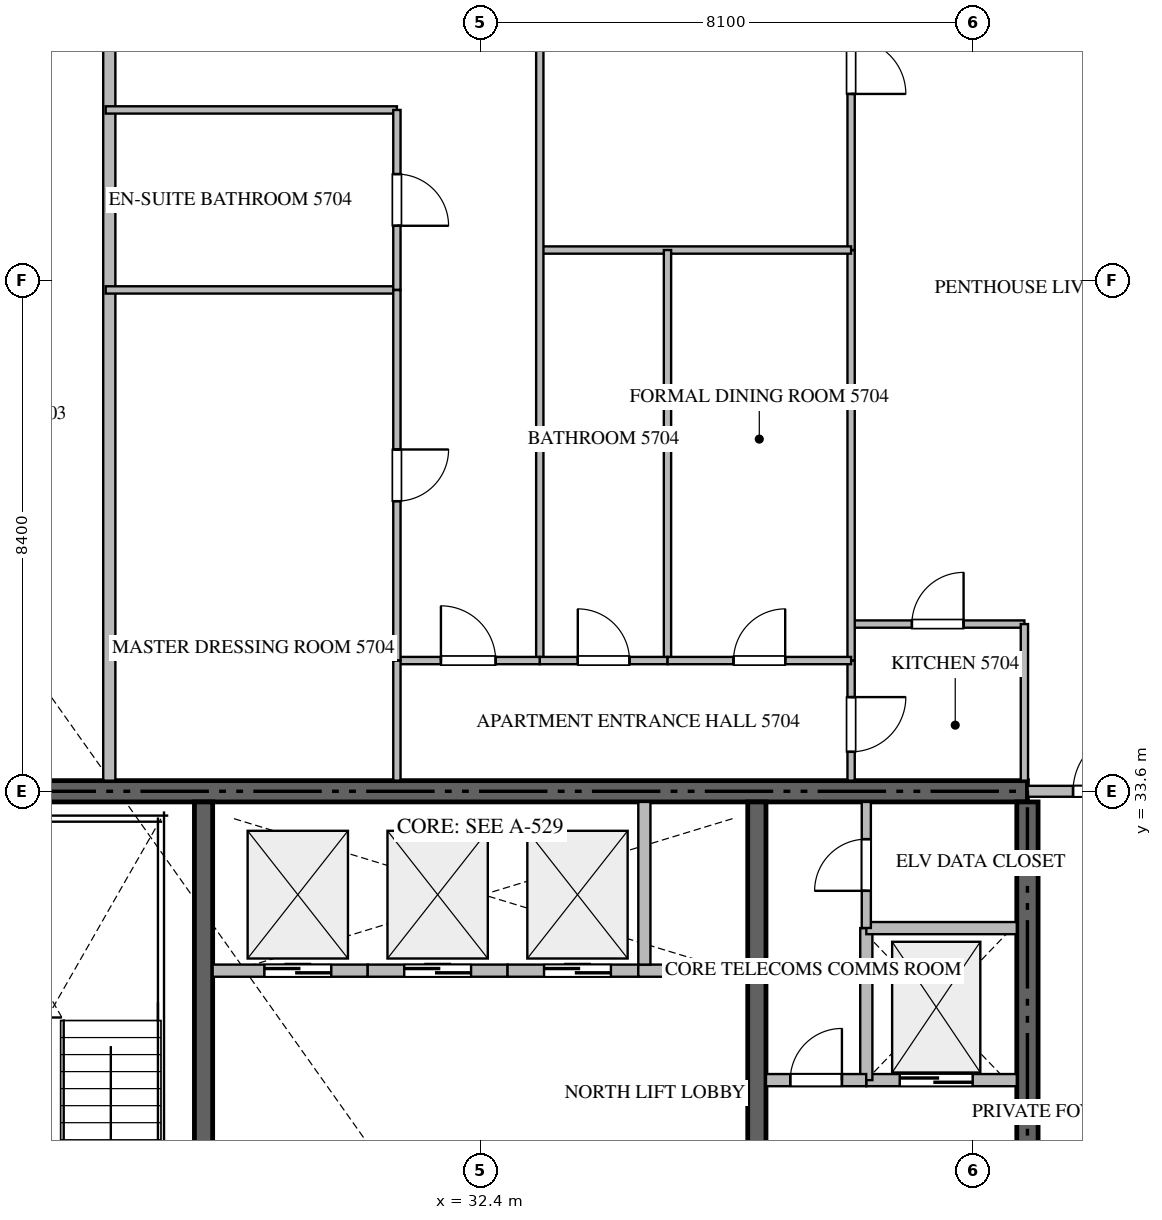
"""IFC4 building model, lengths in metres.
Left out: names, types, materials, properties, quantities, classifications, styles, units other than length and angle.
Written with IfcOpenShell. Run it as: python <this file> out.ifc"""

import sys

from ifc_helpers import new_model, si_unit, direction, frame, frame_2d, origin, place, context, subcontext, project, spatial, rectangle, extrude, source, transform, mapped, element, fill, save


model = new_model("IFC4")
c1 = context("Model", 3, precision=1e-05, world=origin(), true_north=direction((0.0, 1.0)))
c2 = subcontext(c1, "Body", "Model", "MODEL_VIEW")
j1 = project(units=[si_unit("LENGTHUNIT", "METRE"), si_unit("PLANEANGLEUNIT", "RADIAN")], contexts=[c1])
p1 = place(None, origin())
s1 = spatial("IfcSite", under=j1, at=p1, CompositionType="ELEMENT")
p2 = place(p1, origin())
s2 = spatial("IfcBuilding", under=s1, at=p2, CompositionType="ELEMENT")
p3 = place(p2, frame((0.0, 0.0, 229.7)))
s3 = spatial("IfcBuildingStorey", under=s2, at=p3, CompositionType="ELEMENT", Elevation=229.7)
p4 = place(p3, frame((41.4, 33.6, -0.26), z_axis=(0.0, 0.0, 1.0), x_axis=(-1.0, 0.0, 0.0)))
e1 = element("IfcWall", 1, at=p4, inside=s3, PredefinedType="SHEAR", context=c2, shape_type="SweptSolid", body=[
    extrude(rectangle(XDim=18.0, YDim=0.35, at=frame_2d((9.0, 0.0))), origin(), (0.0, 0.0, 1.0), 3.848),
])
p5 = place(p3, frame((41.4, 27.75, -0.26), z_axis=(0.0, 0.0, 1.0), x_axis=(0.0, 1.0, 0.0)))
e2 = element("IfcWall", 2, at=p5, inside=s3, PredefinedType="SHEAR", context=c2, shape_type="SweptSolid", body=[
    extrude(rectangle(XDim=5.675, YDim=0.35, at=frame_2d((2.837, 0.0))), origin(), (0.0, 0.0, 1.0), 3.848),
])
p6 = place(p3, frame((27.85, 23.55, -0.26), z_axis=(0.0, 0.0, 1.0), x_axis=(0.0, 1.0, 0.0)))
e3 = element("IfcWall", 3, at=p6, inside=s3, PredefinedType="SHEAR", context=c2, shape_type="SweptSolid", body=[
    extrude(rectangle(XDim=9.875, YDim=0.3, at=frame_2d((4.938, 0.0))), origin(), (0.0, 0.0, 1.0), 3.848),
])
p7 = place(p3, frame((36.95, 27.05, -0.26), z_axis=(0.0, 0.0, 1.0), x_axis=(0.0, 1.0, 0.0)))
e4 = element("IfcWall", 4, at=p7, inside=s3, PredefinedType="SHEAR", context=c2, shape_type="SweptSolid", body=[
    extrude(rectangle(XDim=6.375, YDim=0.3, at=frame_2d((3.188, 0.0))), origin(), (0.0, 0.0, 1.0), 3.848),
])
p8 = place(p3, frame((38.75, 28.85, 0.0), z_axis=(0.0, 0.0, 1.0), x_axis=(1.0, 0.0, 0.0)))
e5 = element("IfcWall", 5, at=p8, inside=s3, PredefinedType="STANDARD", context=c2, shape_type="SweptSolid", body=[
    extrude(rectangle(XDim=2.475, YDim=0.2, at=frame_2d((1.238, 0.0))), origin(), (0.0, 0.0, 1.0), 3.59),
])
p9 = place(p8, frame((0.55, 0.0, 0.0)))
e6 = element("IfcOpeningElement", 6, at=p9, cuts=e5, PredefinedType="OPENING", context=c2, shape_type="SweptSolid", body=[
    extrude(rectangle(XDim=1.2, YDim=2.2, at=frame_2d((0.6, 1.1))), frame((0.0, 0.11, 0.0), z_axis=(0.0, -1.0, 0.0), x_axis=(1.0, 0.0, 0.0)), (0.0, 0.0, 1.0), 0.22),
])
p10 = place(p3, frame((28.0, 30.65, 0.0), z_axis=(0.0, 0.0, 1.0), x_axis=(1.0, 0.0, 0.0)))
e7 = element("IfcWall", 7, at=p10, inside=s3, PredefinedType="STANDARD", context=c2, shape_type="SweptSolid", body=[
    extrude(rectangle(XDim=2.55, YDim=0.2, at=frame_2d((1.275, 0.0))), origin(), (0.0, 0.0, 1.0), 3.59),
])
p11 = place(p10, frame((0.85, 0.0, 0.0)))
e8 = element("IfcOpeningElement", 8, at=p11, cuts=e7, PredefinedType="OPENING", context=c2, shape_type="SweptSolid", body=[
    extrude(rectangle(XDim=1.1, YDim=2.2, at=frame_2d((0.55, 1.1))), frame((0.0, 0.11, 0.0), z_axis=(0.0, -1.0, 0.0), x_axis=(1.0, 0.0, 0.0)), (0.0, 0.0, 1.0), 0.22),
])
p12 = place(p3, frame((30.55, 30.65, 0.0), z_axis=(0.0, 0.0, 1.0), x_axis=(1.0, 0.0, 0.0)))
e9 = element("IfcWall", 9, at=p12, inside=s3, PredefinedType="STANDARD", context=c2, shape_type="SweptSolid", body=[
    extrude(rectangle(XDim=2.3, YDim=0.2, at=frame_2d((1.15, 0.0))), origin(), (0.0, 0.0, 1.0), 3.59),
])
p13 = place(p12, frame((0.6, 0.0, 0.0)))
e10 = element("IfcOpeningElement", 10, at=p13, cuts=e9, PredefinedType="OPENING", context=c2, shape_type="SweptSolid", body=[
    extrude(rectangle(XDim=1.1, YDim=2.2, at=frame_2d((0.55, 1.1))), frame((0.0, 0.11, 0.0), z_axis=(0.0, -1.0, 0.0), x_axis=(1.0, 0.0, 0.0)), (0.0, 0.0, 1.0), 0.22),
])
p14 = place(p3, frame((32.85, 30.65, 0.0), z_axis=(0.0, 0.0, 1.0), x_axis=(1.0, 0.0, 0.0)))
e11 = element("IfcWall", 11, at=p14, inside=s3, PredefinedType="STANDARD", context=c2, shape_type="SweptSolid", body=[
    extrude(rectangle(XDim=2.15, YDim=0.2, at=frame_2d((1.075, 0.0))), origin(), (0.0, 0.0, 1.0), 3.59),
])
p15 = place(p14, frame((0.6, 0.0, 0.0)))
e12 = element("IfcOpeningElement", 12, at=p15, cuts=e11, PredefinedType="OPENING", context=c2, shape_type="SweptSolid", body=[
    extrude(rectangle(XDim=1.1, YDim=2.2, at=frame_2d((0.55, 1.1))), frame((0.0, 0.11, 0.0), z_axis=(0.0, -1.0, 0.0), x_axis=(1.0, 0.0, 0.0)), (0.0, 0.0, 1.0), 0.22),
])
p16 = place(p3, frame((35.0, 30.65, 0.0), z_axis=(0.0, 0.0, 1.0), x_axis=(1.0, 0.0, 0.0)))
e13 = element("IfcWall", 13, at=p16, inside=s3, PredefinedType="STANDARD", context=c2, shape_type="SweptSolid", body=[
    extrude(rectangle(XDim=1.8, YDim=0.2, at=frame_2d((0.9, 0.0))), origin(), (0.0, 0.0, 1.0), 3.59),
])
p17 = place(p3, frame((35.1, 30.75, 0.0), z_axis=(0.0, 0.0, 1.0), x_axis=(0.0, 1.0, 0.0)))
e14 = element("IfcWall", 14, at=p17, inside=s3, PredefinedType="STANDARD", context=c2, shape_type="SweptSolid", body=[
    extrude(rectangle(XDim=2.675, YDim=0.2, at=frame_2d((1.337, 0.0))), origin(), (0.0, 0.0, 1.0), 3.59),
])
p18 = place(p3, frame((38.75, 28.85, 0.0), z_axis=(0.0, 0.0, 1.0), x_axis=(0.0, 1.0, 0.0)))
e15 = element("IfcWall", 15, at=p18, inside=s3, PredefinedType="STANDARD", context=c2, shape_type="SweptSolid", body=[
    extrude(rectangle(XDim=2.5, YDim=0.2, at=frame_2d((1.25, 0.0))), origin(), (0.0, 0.0, 1.0), 3.59),
])
p19 = place(p3, frame((38.75, 31.35, 0.0), z_axis=(0.0, 0.0, 1.0), x_axis=(1.0, 0.0, 0.0)))
e16 = element("IfcWall", 16, at=p19, inside=s3, PredefinedType="STANDARD", context=c2, shape_type="SweptSolid", body=[
    extrude(rectangle(XDim=2.475, YDim=0.2, at=frame_2d((1.238, 0.0))), origin(), (0.0, 0.0, 1.0), 3.59),
])
p20 = place(p3, frame((37.1, 28.85, 0.0), z_axis=(0.0, 0.0, 1.0), x_axis=(1.0, 0.0, 0.0)))
e17 = element("IfcWall", 17, at=p20, inside=s3, PredefinedType="STANDARD", context=c2, shape_type="SweptSolid", body=[
    extrude(rectangle(XDim=1.648, YDim=0.2, at=frame_2d((0.824, 0.0))), origin(), (0.0, 0.0, 1.0), 3.59),
])
p21 = place(p20, frame((0.399, 0.0, 0.0)))
e18 = element("IfcOpeningElement", 18, at=p21, cuts=e17, PredefinedType="OPENING", context=c2, shape_type="SweptSolid", body=[
    extrude(rectangle(XDim=0.85, YDim=2.1, at=frame_2d((0.425, 1.05))), frame((0.0, 0.11, 0.0), z_axis=(0.0, -1.0, 0.0), x_axis=(1.0, 0.0, 0.0)), (0.0, 0.0, 1.0), 0.22),
])
p22 = place(p3, frame((38.75, 31.352, 0.0), z_axis=(0.0, 0.0, 1.0), x_axis=(0.0, 1.0, 0.0)))
e19 = element("IfcWall", 19, at=p22, inside=s3, PredefinedType="PARTITIONING", context=c2, shape_type="SweptSolid", body=[
    extrude(rectangle(XDim=2.073, YDim=0.15, at=frame_2d((1.037, 0.0))), origin(), (0.0, 0.0, 1.0), 3.59),
])
p23 = place(p22, frame((0.611, 0.0, 0.0)))
e20 = element("IfcOpeningElement", 20, at=p23, cuts=e19, PredefinedType="OPENING", context=c2, shape_type="SweptSolid", body=[
    extrude(rectangle(XDim=0.85, YDim=2.1, at=frame_2d((0.425, 1.05))), frame((0.0, 0.085, 0.0), z_axis=(0.0, -1.0, 0.0), x_axis=(1.0, 0.0, 0.0)), (0.0, 0.0, 1.0), 0.17),
])
p24 = place(p3, frame((26.3, 33.775, 0.0), z_axis=(0.0, 0.0, 1.0), x_axis=(0.0, 1.0, 0.0)))
e21 = element("IfcWall", 21, at=p24, inside=s3, PredefinedType="PARTITIONING", context=c2, shape_type="SweptSolid", body=[
    extrude(rectangle(XDim=15.343, YDim=0.2, at=frame_2d((7.671, 0.0))), origin(), (0.0, 0.0, 1.0), 3.59),
])
p25 = place(p3, frame((41.402, 33.6, 0.0), z_axis=(0.0, 0.0, 1.0), x_axis=(1.0, 0.0, 0.0)))
e22 = element("IfcWall", 22, at=p25, inside=s3, PredefinedType="PARTITIONING", context=c2, shape_type="SweptSolid", body=[
    extrude(rectangle(XDim=2.496, YDim=0.18, at=frame_2d((1.248, 0.0))), origin(), (0.0, 0.0, 1.0), 3.59),
])
p26 = place(p25, frame((0.748, 0.0, 0.0)))
e23 = element("IfcOpeningElement", 23, at=p26, cuts=e22, PredefinedType="OPENING", context=c2, shape_type="SweptSolid", body=[
    extrude(rectangle(XDim=1.0, YDim=2.15, at=frame_2d((0.5, 1.075))), frame((0.0, 0.1, 0.0), z_axis=(0.0, -1.0, 0.0), x_axis=(1.0, 0.0, 0.0)), (0.0, 0.0, 1.0), 0.2),
])
p27 = place(p3, frame((38.5, 36.35, 0.0), z_axis=(0.0, 0.0, 1.0), x_axis=(1.0, 0.0, 0.0)))
e24 = element("IfcWall", 24, at=p27, inside=s3, PredefinedType="PARTITIONING", context=c2, shape_type="SweptSolid", body=[
    extrude(rectangle(XDim=2.85, YDim=0.12, at=frame_2d((1.425, 0.0))), origin(), (0.0, 0.0, 1.0), 3.59),
])
p28 = place(p27, frame((1.0, 0.0, 0.0)))
e25 = element("IfcOpeningElement", 25, at=p28, cuts=e24, PredefinedType="OPENING", context=c2, shape_type="SweptSolid", body=[
    extrude(rectangle(XDim=0.85, YDim=2.1, at=frame_2d((0.425, 1.05))), frame((0.0, 0.07, 0.0), z_axis=(0.0, -1.0, 0.0), x_axis=(1.0, 0.0, 0.0)), (0.0, 0.0, 1.0), 0.14),
])
p29 = place(p3, frame((41.35, 36.35, 0.0), z_axis=(0.0, 0.0, 1.0), x_axis=(0.0, -1.0, 0.0)))
e26 = element("IfcWall", 26, at=p29, inside=s3, PredefinedType="PARTITIONING", context=c2, shape_type="SweptSolid", body=[
    extrude(rectangle(XDim=2.575, YDim=0.12, at=frame_2d((1.288, 0.0))), origin(), (0.0, 0.0, 1.0), 3.59),
])
p30 = place(p3, frame((38.5, 35.75, 0.0), z_axis=(0.0, 0.0, 1.0), x_axis=(0.0, -1.0, 0.0)))
e27 = element("IfcWall", 27, at=p30, inside=s3, PredefinedType="PARTITIONING", context=c2, shape_type="SweptSolid", body=[
    extrude(rectangle(XDim=1.975, YDim=0.12, at=frame_2d((0.988, 0.0))), origin(), (0.0, 0.0, 1.0), 3.59),
])
p31 = place(p30, frame((0.601, 0.0, 0.0)))
e28 = element("IfcOpeningElement", 28, at=p31, cuts=e27, PredefinedType="OPENING", context=c2, shape_type="SweptSolid", body=[
    extrude(rectangle(XDim=0.9, YDim=2.1, at=frame_2d((0.45, 1.05))), frame((0.0, 0.07, 0.0), z_axis=(0.0, -1.0, 0.0), x_axis=(1.0, 0.0, 0.0)), (0.0, 0.0, 1.0), 0.14),
])
p32 = place(p3, frame((38.5, 49.105, 0.0), z_axis=(0.0, 0.0, 1.0), x_axis=(0.0, -1.0, 0.0)))
e29 = element("IfcWall", 29, at=p32, inside=s3, PredefinedType="PARTITIONING", context=c2, shape_type="SweptSolid", body=[
    extrude(rectangle(XDim=6.604, YDim=0.12, at=frame_2d((3.302, 0.0))), origin(), (0.0, 0.0, 1.0), 3.59),
])
p33 = place(p32, frame((3.137, 0.0, 0.0)))
e30 = element("IfcOpeningElement", 30, at=p33, cuts=e29, PredefinedType="OPENING", context=c2, shape_type="SweptSolid", body=[
    extrude(rectangle(XDim=0.9, YDim=2.1, at=frame_2d((0.45, 1.05))), frame((0.0, 0.07, 0.0), z_axis=(0.0, -1.0, 0.0), x_axis=(1.0, 0.0, 0.0)), (0.0, 0.0, 1.0), 0.14),
])
p34 = place(p3, frame((38.5, 42.499, 0.0), z_axis=(0.0, 0.0, 1.0), x_axis=(0.0, -1.0, 0.0)))
e31 = element("IfcWall", 31, at=p34, inside=s3, PredefinedType="PARTITIONING", context=c2, shape_type="SweptSolid", body=[
    extrude(rectangle(XDim=6.747, YDim=0.12, at=frame_2d((3.374, 0.0))), origin(), (0.0, 0.0, 1.0), 3.59),
])
p35 = place(p3, frame((33.38, 42.501, 0.0), z_axis=(0.0, 0.0, 1.0), x_axis=(1.0, 0.0, 0.0)))
e32 = element("IfcWall", 32, at=p35, inside=s3, PredefinedType="PARTITIONING", context=c2, shape_type="SweptSolid", body=[
    extrude(rectangle(XDim=5.12, YDim=0.12, at=frame_2d((2.56, 0.0))), origin(), (0.0, 0.0, 1.0), 3.59),
])
p36 = place(p3, frame((33.38, 49.105, 0.0), z_axis=(0.0, 0.0, 1.0), x_axis=(0.0, -1.0, 0.0)))
e33 = element("IfcWall", 33, at=p36, inside=s3, PredefinedType="PARTITIONING", context=c2, shape_type="SweptSolid", body=[
    extrude(rectangle(XDim=13.355, YDim=0.12, at=frame_2d((6.677, 0.0))), origin(), (0.0, 0.0, 1.0), 3.59),
])
p37 = place(p3, frame((35.48, 42.501, 0.0), z_axis=(0.0, 0.0, 1.0), x_axis=(0.0, -1.0, 0.0)))
e34 = element("IfcWall", 34, at=p37, inside=s3, PredefinedType="PARTITIONING", context=c2, shape_type="SweptSolid", body=[
    extrude(rectangle(XDim=6.751, YDim=0.12, at=frame_2d((3.375, 0.0))), origin(), (0.0, 0.0, 1.0), 3.59),
])
p38 = place(p3, frame((33.38, 35.75, 0.0), z_axis=(0.0, 0.0, 1.0), x_axis=(1.0, 0.0, 0.0)))
e35 = element("IfcWall", 35, at=p38, inside=s3, PredefinedType="PARTITIONING", context=c2, shape_type="SweptSolid", body=[
    extrude(rectangle(XDim=2.1, YDim=0.12, at=frame_2d((1.05, 0.0))), origin(), (0.0, 0.0, 1.0), 3.59),
])
p39 = place(p38, frame((0.625, 0.0, 0.0)))
e36 = element("IfcOpeningElement", 36, at=p39, cuts=e35, PredefinedType="OPENING", context=c2, shape_type="SweptSolid", body=[
    extrude(rectangle(XDim=0.85, YDim=2.1, at=frame_2d((0.425, 1.05))), frame((0.0, 0.07, 0.0), z_axis=(0.0, -1.0, 0.0), x_axis=(1.0, 0.0, 0.0)), (0.0, 0.0, 1.0), 0.14),
])
p40 = place(p3, frame((35.482, 35.75, 0.0), z_axis=(0.0, 0.0, 1.0), x_axis=(1.0, 0.0, 0.0)))
e37 = element("IfcWall", 37, at=p40, inside=s3, PredefinedType="PARTITIONING", context=c2, shape_type="SweptSolid", body=[
    extrude(rectangle(XDim=3.018, YDim=0.12, at=frame_2d((1.509, 0.0))), origin(), (0.0, 0.0, 1.0), 3.59),
])
p41 = place(p40, frame((1.084, 0.0, 0.0)))
e38 = element("IfcOpeningElement", 38, at=p41, cuts=e37, PredefinedType="OPENING", context=c2, shape_type="SweptSolid", body=[
    extrude(rectangle(XDim=0.85, YDim=2.1, at=frame_2d((0.425, 1.05))), frame((0.0, 0.07, 0.0), z_axis=(0.0, -1.0, 0.0), x_axis=(1.0, 0.0, 0.0)), (0.0, 0.0, 1.0), 0.14),
])
p42 = place(p3, frame((31.03, 35.75, 0.0), z_axis=(0.0, 0.0, 1.0), x_axis=(1.0, 0.0, 0.0)))
e39 = element("IfcWall", 39, at=p42, inside=s3, PredefinedType="PARTITIONING", context=c2, shape_type="SweptSolid", body=[
    extrude(rectangle(XDim=2.348, YDim=0.12, at=frame_2d((1.174, 0.0))), origin(), (0.0, 0.0, 1.0), 3.59),
])
p43 = place(p42, frame((0.724, 0.0, 0.0)))
e40 = element("IfcOpeningElement", 40, at=p43, cuts=e39, PredefinedType="OPENING", context=c2, shape_type="SweptSolid", body=[
    extrude(rectangle(XDim=0.9, YDim=2.1, at=frame_2d((0.45, 1.05))), frame((0.0, 0.07, 0.0), z_axis=(0.0, -1.0, 0.0), x_axis=(1.0, 0.0, 0.0)), (0.0, 0.0, 1.0), 0.14),
])
for number, where, z_axis, x_axis in (
    (41, (26.24, 44.805, 0.0), (0.0, 0.0, 1.0), (1.0, 0.0, 0.0)),
    (42, (26.24, 41.845, 0.0), (0.0, 0.0, 1.0), (1.0, 0.0, 0.0)),
):
    element("IfcWall", number, at=place(p3, frame(where, z_axis=z_axis, x_axis=x_axis)), inside=s3, PredefinedType="PARTITIONING", context=c2, shape_type="SweptSolid", body=[
        extrude(rectangle(XDim=4.79, YDim=0.12, at=frame_2d((2.395, 0.0))), origin(), (0.0, 0.0, 1.0), 3.59),
    ])
p44 = place(p3, frame((31.03, 44.805, 0.0), z_axis=(0.0, 0.0, 1.0), x_axis=(0.0, -1.0, 0.0)))
e43 = element("IfcWall", 43, at=p44, inside=s3, PredefinedType="PARTITIONING", context=c2, shape_type="SweptSolid", body=[
    extrude(rectangle(XDim=2.96, YDim=0.12, at=frame_2d((1.48, 0.0))), origin(), (0.0, 0.0, 1.0), 3.59),
])
p45 = place(p44, frame((1.055, 0.0, 0.0)))
e44 = element("IfcOpeningElement", 44, at=p45, cuts=e43, PredefinedType="OPENING", context=c2, shape_type="SweptSolid", body=[
    extrude(rectangle(XDim=0.85, YDim=2.1, at=frame_2d((0.425, 1.05))), frame((0.0, 0.07, 0.0), z_axis=(0.0, -1.0, 0.0), x_axis=(1.0, 0.0, 0.0)), (0.0, 0.0, 1.0), 0.14),
])
p46 = place(p3, frame((31.03, 41.843, 0.0), z_axis=(0.0, 0.0, 1.0), x_axis=(0.0, -1.0, 0.0)))
e45 = element("IfcWall", 45, at=p46, inside=s3, PredefinedType="PARTITIONING", context=c2, shape_type="SweptSolid", body=[
    extrude(rectangle(XDim=6.093, YDim=0.12, at=frame_2d((3.046, 0.0))), origin(), (0.0, 0.0, 1.0), 3.59),
])
p47 = place(p46, frame((2.622, 0.0, 0.0)))
e46 = element("IfcOpeningElement", 46, at=p47, cuts=e45, PredefinedType="OPENING", context=c2, shape_type="SweptSolid", body=[
    extrude(rectangle(XDim=0.85, YDim=2.1, at=frame_2d((0.425, 1.05))), frame((0.0, 0.07, 0.0), z_axis=(0.0, -1.0, 0.0), x_axis=(1.0, 0.0, 0.0)), (0.0, 0.0, 1.0), 0.14),
])
p48 = place(p3, frame((31.03, 35.748, 0.0), z_axis=(0.0, 0.0, 1.0), x_axis=(0.0, -1.0, 0.0)))
e47 = element("IfcWall", 47, at=p48, inside=s3, PredefinedType="PARTITIONING", context=c2, shape_type="SweptSolid", body=[
    extrude(rectangle(XDim=1.973, YDim=0.12, at=frame_2d((0.987, 0.0))), origin(), (0.0, 0.0, 1.0), 3.59),
])
m1 = source(origin(), c2, "Body", "SweptSolid", [
    extrude(rectangle(XDim=1.2, YDim=2.2, at=frame_2d((0.6, 1.1))), frame((0.0, 0.025, 0.0), z_axis=(0.0, -1.0, 0.0), x_axis=(1.0, 0.0, 0.0)), (0.0, 0.0, 1.0), 0.05),
])
p49 = place(p9, origin())
e48 = element("IfcDoor", 48, at=p49, inside=s3, OperationType="DOUBLE_DOOR_SLIDING", PredefinedType="DOOR", context=c2, shape_type="MappedRepresentation", body=[
    mapped(m1, transform((0.0, 0.0, 0.0), scale=1.0)),
])
fill(e6, e48)
m2 = source(origin(), c2, "Body", "SweptSolid", [
    extrude(rectangle(XDim=1.1, YDim=2.2, at=frame_2d((0.55, 1.1))), frame((0.0, 0.025, 0.0), z_axis=(0.0, -1.0, 0.0), x_axis=(1.0, 0.0, 0.0)), (0.0, 0.0, 1.0), 0.05),
])
p50 = place(p11, origin())
e49 = element("IfcDoor", 49, at=p50, inside=s3, OperationType="DOUBLE_DOOR_SLIDING", PredefinedType="DOOR", context=c2, shape_type="MappedRepresentation", body=[
    mapped(m2, transform((0.0, 0.0, 0.0), scale=1.0)),
])
fill(e8, e49)
p51 = place(p13, origin())
e50 = element("IfcDoor", 50, at=p51, inside=s3, OperationType="DOUBLE_DOOR_SLIDING", PredefinedType="DOOR", context=c2, shape_type="MappedRepresentation", body=[
    mapped(m2, transform((0.0, 0.0, 0.0), scale=1.0)),
])
fill(e10, e50)
p52 = place(p15, origin())
e51 = element("IfcDoor", 51, at=p52, inside=s3, OperationType="DOUBLE_DOOR_SLIDING", PredefinedType="DOOR", context=c2, shape_type="MappedRepresentation", body=[
    mapped(m2, transform((0.0, 0.0, 0.0), scale=1.0)),
])
fill(e12, e51)
m3 = source(origin(), c2, "Body", "SweptSolid", [
    extrude(rectangle(XDim=0.85, YDim=2.1, at=frame_2d((0.425, 1.05))), frame((0.0, 0.025, 0.0), z_axis=(0.0, -1.0, 0.0), x_axis=(1.0, 0.0, 0.0)), (0.0, 0.0, 1.0), 0.05),
])
p53 = place(p21, origin())
e52 = element("IfcDoor", 52, at=p53, inside=s3, OperationType="SINGLE_SWING_RIGHT", PredefinedType="DOOR", context=c2, shape_type="MappedRepresentation", body=[
    mapped(m3, transform((0.0, 0.0, 0.0), scale=1.0)),
])
fill(e18, e52)
p54 = place(p23, origin())
e53 = element("IfcDoor", 53, at=p54, inside=s3, OperationType="SINGLE_SWING_LEFT", PredefinedType="DOOR", context=c2, shape_type="MappedRepresentation", body=[
    mapped(m3, transform((0.0, 0.0, 0.0), scale=1.0)),
])
fill(e20, e53)
m4 = source(origin(), c2, "Body", "SweptSolid", [
    extrude(rectangle(XDim=1.0, YDim=2.15, at=frame_2d((0.5, 1.075))), frame((0.0, 0.025, 0.0), z_axis=(0.0, -1.0, 0.0), x_axis=(1.0, 0.0, 0.0)), (0.0, 0.0, 1.0), 0.05),
])
p55 = place(p26, origin())
e54 = element("IfcDoor", 54, at=p55, inside=s3, OperationType="SINGLE_SWING_RIGHT", PredefinedType="DOOR", context=c2, shape_type="MappedRepresentation", body=[
    mapped(m4, transform((0.0, 0.0, 0.0), scale=1.0)),
])
fill(e23, e54)
p56 = place(p28, origin())
e55 = element("IfcDoor", 55, at=p56, inside=s3, OperationType="SINGLE_SWING_RIGHT", PredefinedType="DOOR", context=c2, shape_type="MappedRepresentation", body=[
    mapped(m3, transform((0.0, 0.0, 0.0), scale=1.0)),
])
fill(e25, e55)
m5 = source(origin(), c2, "Body", "SweptSolid", [
    extrude(rectangle(XDim=0.9, YDim=2.1, at=frame_2d((0.45, 1.05))), frame((0.0, 0.025, 0.0), z_axis=(0.0, -1.0, 0.0), x_axis=(1.0, 0.0, 0.0)), (0.0, 0.0, 1.0), 0.05),
])
p57 = place(p31, origin())
e56 = element("IfcDoor", 56, at=p57, inside=s3, OperationType="SINGLE_SWING_LEFT", PredefinedType="DOOR", context=c2, shape_type="MappedRepresentation", body=[
    mapped(m5, transform((0.0, 0.0, 0.0), scale=1.0)),
])
fill(e28, e56)
p58 = place(p33, origin())
e57 = element("IfcDoor", 57, at=p58, inside=s3, OperationType="SINGLE_SWING_RIGHT", PredefinedType="DOOR", context=c2, shape_type="MappedRepresentation", body=[
    mapped(m5, transform((0.0, 0.0, 0.0), scale=1.0)),
])
fill(e30, e57)
p59 = place(p39, origin())
e58 = element("IfcDoor", 58, at=p59, inside=s3, OperationType="SINGLE_SWING_LEFT", PredefinedType="DOOR", context=c2, shape_type="MappedRepresentation", body=[
    mapped(m3, transform((0.0, 0.0, 0.0), scale=1.0)),
])
fill(e36, e58)
p60 = place(p41, origin())
e59 = element("IfcDoor", 59, at=p60, inside=s3, OperationType="SINGLE_SWING_RIGHT", PredefinedType="DOOR", context=c2, shape_type="MappedRepresentation", body=[
    mapped(m3, transform((0.0, 0.0, 0.0), scale=1.0)),
])
fill(e38, e59)
p61 = place(p43, origin())
e60 = element("IfcDoor", 60, at=p61, inside=s3, OperationType="SINGLE_SWING_LEFT", PredefinedType="DOOR", context=c2, shape_type="MappedRepresentation", body=[
    mapped(m5, transform((0.0, 0.0, 0.0), scale=1.0)),
])
fill(e40, e60)
p62 = place(p45, origin())
e61 = element("IfcDoor", 61, at=p62, inside=s3, OperationType="SINGLE_SWING_RIGHT", PredefinedType="DOOR", context=c2, shape_type="MappedRepresentation", body=[
    mapped(m3, transform((0.0, 0.0, 0.0), scale=1.0)),
])
fill(e44, e61)
p63 = place(p47, origin())
e62 = element("IfcDoor", 62, at=p63, inside=s3, OperationType="SINGLE_SWING_LEFT", PredefinedType="DOOR", context=c2, shape_type="MappedRepresentation", body=[
    mapped(m3, transform((0.0, 0.0, 0.0), scale=1.0)),
])
fill(e46, e62)
save(model, sys.argv[1])
